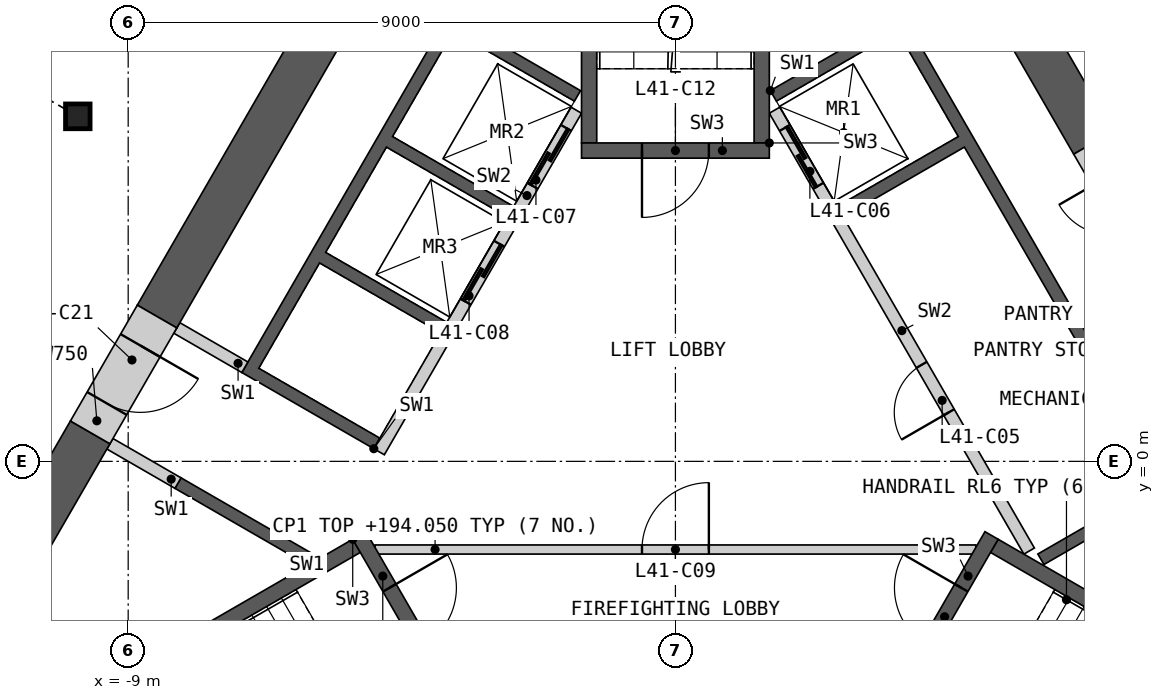
"""IFC4 building model, lengths in metres.
Left out: names, types, materials, properties, quantities, classifications, styles, units other than length and angle.
Written with IfcOpenShell. Run it as: python <this file> out.ifc"""

import sys

from ifc_helpers import new_model, si_unit, direction, frame, frame_2d, origin, origin_2d, place, context, subcontext, project, spatial, polyline, rectangle, i_section, outline, extrude, element, fill, save


model = new_model("IFC4")
c1 = context("Model", 3, precision=1e-05, world=origin(), true_north=direction((0.0, 1.0)))
c2 = subcontext(c1, "Body", "Model", "MODEL_VIEW")
j1 = project(units=[si_unit("LENGTHUNIT", "METRE"), si_unit("PLANEANGLEUNIT", "RADIAN")], contexts=[c1])
p1 = place(None, origin())
s1 = spatial("IfcSite", under=j1, at=p1, CompositionType="ELEMENT")
p2 = place(p1, origin())
s2 = spatial("IfcBuilding", under=s1, at=p2, CompositionType="ELEMENT")
p3 = place(p2, frame((0.0, 0.0, 190.8)))
s3 = spatial("IfcBuildingStorey", under=s2, at=p3, CompositionType="ELEMENT", Elevation=190.8)
p4 = place(p3, frame((-9.828, 5.675, 0.0), z_axis=(0.0, 0.0, 1.0), x_axis=(1.0, 0.0, 0.0)))
e1 = element("IfcColumn", 1, at=p4, inside=s3, PredefinedType="COLUMN", context=c2, shape_type="SweptSolid", body=[
    extrude(i_section(OverallWidth=0.404, OverallDepth=0.407, WebThickness=0.027, FlangeThickness=0.044, at=origin_2d()), origin(), (0.0, 0.0, 1.0), 3.6),
])
p5 = place(p3, origin())
e2 = element("IfcWall", 2, at=p5, inside=s3, PredefinedType="SHEAR", context=c2, shape_type="SweptSolid", body=[
    extrude(outline(polyline([(1.561, 6.097), (3.731, 7.35), (8.231, -0.444), (6.061, -1.697), (5.96, -1.524), (7.952, -0.374), (4.752, 5.169), (2.76, 4.019), (2.66, 4.192), (4.652, 5.342), (3.652, 7.074), (1.66, 5.924), (1.561, 6.097)])), origin(), (0.0, 0.0, 1.0), 3.25),
])
p6 = place(p3, frame((5.817, -1.476, 0.0), z_axis=(0.0, 0.0, 1.0), x_axis=(-0.500002616675, 0.866023893041, 0.0)))
e3 = element("IfcWall", 3, at=p6, inside=s3, PredefinedType="SOLIDWALL", context=c2, shape_type="SweptSolid", body=[
    extrude(rectangle(XDim=8.373, YDim=0.2, at=frame_2d((4.187, 0.0))), origin(), (0.0, 0.0, 1.0), 3.25),
])
p7 = place(p6, frame((2.637, 0.0, 0.0)))
e4 = element("IfcOpeningElement", 4, at=p7, cuts=e3, PredefinedType="OPENING", context=c2, shape_type="SweptSolid", body=[
    extrude(rectangle(XDim=0.9, YDim=2.1, at=frame_2d((0.45, 1.05))), frame((0.0, 0.11, 0.0), z_axis=(0.0, -1.0, 0.0), x_axis=(1.0, 0.0, 0.0)), (0.0, 0.0, 1.0), 0.22),
])
p8 = place(p6, frame((6.937, 0.0, 0.0)))
e5 = element("IfcOpeningElement", 5, at=p8, cuts=e3, PredefinedType="OPENING", context=c2, shape_type="SweptSolid", body=[
    extrude(rectangle(XDim=1.1, YDim=2.1, at=frame_2d((0.55, 1.05))), frame((0.0, 0.11, 0.0), z_axis=(0.0, -1.0, 0.0), x_axis=(1.0, 0.0, 0.0)), (0.0, 0.0, 1.0), 0.22),
])
p9 = place(p3, origin())
e6 = element("IfcWall", 6, at=p9, inside=s3, PredefinedType="SHEAR", context=c2, shape_type="SweptSolid", body=[
    extrude(outline(polyline([(-6.061, -1.697), (-8.231, -0.444), (-8.131, -0.271), (-5.96, -1.524), (-6.061, -1.697)])), origin(), (0.0, 0.0, 1.0), 3.25),
])
p10 = place(p3, origin())
e7 = element("IfcWall", 7, at=p10, inside=s3, PredefinedType="SHEAR", context=c2, shape_type="SweptSolid", body=[
    extrude(outline(polyline([(-4.96, 0.208), (-7.131, 1.461), (-3.731, 7.35), (-1.561, 6.097), (-1.66, 5.924), (-3.652, 7.074), (-4.652, 5.342), (-2.66, 4.192), (-2.76, 4.019), (-4.752, 5.169), (-5.752, 3.437), (-3.76, 2.287), (-3.861, 2.113), (-5.852, 3.263), (-6.852, 1.531), (-4.861, 0.381), (-4.96, 0.208)])), origin(), (0.0, 0.0, 1.0), 3.25),
])
p11 = place(p3, frame((-1.631, 5.776, 0.0), z_axis=(0.0, 0.0, 1.0), x_axis=(-0.499992876559, -0.866029516466, 0.0)))
e8 = element("IfcWall", 8, at=p11, inside=s3, PredefinedType="SOLIDWALL", context=c2, shape_type="SweptSolid", body=[
    extrude(rectangle(XDim=6.486, YDim=0.2, at=frame_2d((3.243, 0.0))), origin(), (0.0, 0.0, 1.0), 3.25),
])
p12 = place(p11, frame((0.337, 0.0, 0.0)))
e9 = element("IfcOpeningElement", 9, at=p12, cuts=e8, PredefinedType="OPENING", context=c2, shape_type="SweptSolid", body=[
    extrude(rectangle(XDim=1.1, YDim=2.1, at=frame_2d((0.55, 1.05))), frame((0.0, 0.11, 0.0), z_axis=(0.0, -1.0, 0.0), x_axis=(1.0, 0.0, 0.0)), (0.0, 0.0, 1.0), 0.22),
])
p13 = place(p11, frame((2.537, 0.0, 0.0)))
e10 = element("IfcOpeningElement", 10, at=p13, cuts=e8, PredefinedType="OPENING", context=c2, shape_type="SweptSolid", body=[
    extrude(rectangle(XDim=1.1, YDim=2.1, at=frame_2d((0.55, 1.05))), frame((0.0, 0.11, 0.0), z_axis=(0.0, -1.0, 0.0), x_axis=(1.0, 0.0, 0.0)), (0.0, 0.0, 1.0), 0.22),
])
for number, where, z_axis, x_axis in (
    (11, (-7.081, 1.548, 0.0), (0.0, 0.0, 1.0), (-0.866, 0.5, 0.0)),
    (12, (-8.181, -0.357, 0.0), (0.0, 0.0, 1.0), (-0.866, 0.5, 0.0)),
):
    element("IfcWall", number, at=place(p3, frame(where, z_axis=z_axis, x_axis=x_axis)), inside=s3, PredefinedType="SHEAR", context=c2, shape_type="SweptSolid", body=[
        extrude(rectangle(XDim=1.293, YDim=0.2, at=frame_2d((0.646, 0.0))), origin(), (0.0, 0.0, 1.0), 3.25),
    ])
p14 = place(p3, frame((-4.941, -1.45, 0.0), z_axis=(0.0, 0.0, 1.0), x_axis=(1.0, 0.0, 0.0)))
e13 = element("IfcWall", 13, at=p14, inside=s3, PredefinedType="PARTITIONING", context=c2, shape_type="SweptSolid", body=[
    extrude(rectangle(XDim=9.882, YDim=0.15, at=frame_2d((4.941, 0.0))), origin(), (0.0, 0.0, 1.0), 3.25),
])
p15 = place(p14, frame((4.391, 0.0, 0.0)))
e14 = element("IfcOpeningElement", 14, at=p15, cuts=e13, PredefinedType="OPENING", context=c2, shape_type="SweptSolid", body=[
    extrude(rectangle(XDim=1.1, YDim=2.1, at=frame_2d((0.55, 1.05))), frame((0.0, 0.085, 0.0), z_axis=(0.0, -1.0, 0.0), x_axis=(1.0, 0.0, 0.0)), (0.0, 0.0, 1.0), 0.17),
])
p16 = place(p3, origin())
e15 = element("IfcWall", 15, at=p16, inside=s3, PredefinedType="SHEAR", context=c2, shape_type="SweptSolid", body=[
    extrude(outline(polyline([(-5.307, -1.281), (-10.374, -4.206), (-10.032, -4.298), (-5.182, -1.498), (-5.307, -1.281)])), origin(), (0.0, 0.0, 1.0), 3.25),
])
p17 = place(p3, frame((-5.199, -1.219, 0.0), z_axis=(0.0, 0.0, 1.0), x_axis=(0.499982516597, -0.866035497597, 0.0)))
e16 = element("IfcWall", 16, at=p17, inside=s3, PredefinedType="SHEAR", context=c2, shape_type="SweptSolid", body=[
    extrude(rectangle(XDim=3.088, YDim=0.25, at=frame_2d((1.544, 0.0))), origin(), (0.0, 0.0, 1.0), 3.25),
])
p18 = place(p17, frame((0.994, 0.0, 0.0)))
e17 = element("IfcOpeningElement", 17, at=p18, cuts=e16, PredefinedType="OPENING", context=c2, shape_type="SweptSolid", body=[
    extrude(rectangle(XDim=1.1, YDim=2.1, at=frame_2d((0.55, 1.05))), frame((0.0, 0.135, 0.0), z_axis=(0.0, -1.0, 0.0), x_axis=(1.0, 0.0, 0.0)), (0.0, 0.0, 1.0), 0.27),
])
p19 = place(p3, origin())
e18 = element("IfcWall", 18, at=p19, inside=s3, PredefinedType="SHEAR", context=c2, shape_type="SweptSolid", body=[
    extrude(outline(polyline([(10.032, -4.298), (10.374, -4.206), (5.307, -1.281), (5.182, -1.498), (10.032, -4.298)])), origin(), (0.0, 0.0, 1.0), 3.25),
])
p20 = place(p3, frame((3.655, -3.893, 0.0), z_axis=(0.0, 0.0, 1.0), x_axis=(0.499982516597, 0.866035497597, 0.0)))
e19 = element("IfcWall", 19, at=p20, inside=s3, PredefinedType="SHEAR", context=c2, shape_type="SweptSolid", body=[
    extrude(rectangle(XDim=3.088, YDim=0.25, at=frame_2d((1.544, 0.0))), origin(), (0.0, 0.0, 1.0), 3.25),
])
p21 = place(p20, frame((0.994, 0.0, 0.0)))
e20 = element("IfcOpeningElement", 20, at=p21, cuts=e19, PredefinedType="OPENING", context=c2, shape_type="SweptSolid", body=[
    extrude(rectangle(XDim=1.1, YDim=2.1, at=frame_2d((0.55, 1.05))), frame((0.0, 0.135, 0.0), z_axis=(0.0, -1.0, 0.0), x_axis=(1.0, 0.0, 0.0)), (0.0, 0.0, 1.0), 0.27),
])
p22 = place(p3, origin())
e21 = element("IfcWall", 21, at=p22, inside=s3, PredefinedType="SHEAR", context=c2, shape_type="SweptSolid", body=[
    extrude(outline(polyline([(1.544, 5.237), (1.544, 11.087), (1.294, 10.837), (1.294, 5.237), (1.544, 5.237)])), origin(), (0.0, 0.0, 1.0), 3.25),
])
p23 = place(p3, origin())
e22 = element("IfcWall", 22, at=p23, inside=s3, PredefinedType="SHEAR", context=c2, shape_type="SweptSolid", body=[
    extrude(outline(polyline([(-1.294, 10.837), (-1.544, 11.087), (-1.544, 5.237), (-1.294, 5.237), (-1.294, 10.837)])), origin(), (0.0, 0.0, 1.0), 3.25),
])
p24 = place(p3, frame((1.544, 5.112, 0.0), z_axis=(0.0, 0.0, 1.0), x_axis=(-1.0, 0.0, 0.0)))
e23 = element("IfcWall", 23, at=p24, inside=s3, PredefinedType="SHEAR", context=c2, shape_type="SweptSolid", body=[
    extrude(rectangle(XDim=3.088, YDim=0.25, at=frame_2d((1.544, 0.0))), origin(), (0.0, 0.0, 1.0), 3.25),
])
p25 = place(p24, frame((0.994, 0.0, 0.0)))
e24 = element("IfcOpeningElement", 24, at=p25, cuts=e23, PredefinedType="OPENING", context=c2, shape_type="SweptSolid", body=[
    extrude(rectangle(XDim=1.1, YDim=2.1, at=frame_2d((0.55, 1.05))), frame((0.0, 0.135, 0.0), z_axis=(0.0, -1.0, 0.0), x_axis=(1.0, 0.0, 0.0)), (0.0, 0.0, 1.0), 0.27),
])
p26 = place(p3, frame((6.875, 5.24, 0.0), z_axis=(0.0, 0.0, 1.0), x_axis=(-0.499997217876, 0.866027010039, 0.0)))
e25 = element("IfcWall", 25, at=p26, inside=s3, PredefinedType="SHEAR", context=c2, shape_type="SweptSolid", body=[
    extrude(rectangle(XDim=13.101, YDim=0.75, at=frame_2d((6.551, 0.0))), origin(), (0.0, 0.0, 1.0), 3.25),
])
p27 = place(p3, frame((-4.95, 8.574, 0.0), z_axis=(0.0, 0.0, 1.0), x_axis=(-0.499987463267, -0.866032641749, 0.0)))
e26 = element("IfcWall", 26, at=p27, inside=s3, PredefinedType="SHEAR", context=c2, shape_type="SweptSolid", body=[
    extrude(rectangle(XDim=7.151, YDim=0.75, at=frame_2d((3.575, 0.0))), origin(), (0.0, 0.0, 1.0), 3.25),
])
p28 = place(p3, frame((-9.625, 0.477, 0.0), z_axis=(0.0, 0.0, 1.0), x_axis=(-0.499951145694, -0.866053607994, 0.0)))
e27 = element("IfcWall", 27, at=p28, inside=s3, PredefinedType="SHEAR", context=c2, shape_type="SweptSolid", body=[
    extrude(rectangle(XDim=3.851, YDim=0.75, at=frame_2d((1.925, 0.0))), origin(), (0.0, 0.0, 1.0), 3.25),
])
p29 = place(p3, frame((7.975, 3.334, 0.0), z_axis=(0.0, 0.0, 1.0), x_axis=(-0.500077893725, 0.86598042715, 0.0)))
e28 = element("IfcWall", 28, at=p29, inside=s3, PredefinedType="SHEAR", context=c2, shape_type="SweptSolid", body=[
    extrude(rectangle(XDim=2.2, YDim=0.75, at=frame_2d((1.1, 0.0))), origin(), (0.0, 0.0, 1.0), 3.25),
])
p30 = place(p29, frame((0.6, 0.0, 0.0)))
e29 = element("IfcOpeningElement", 29, at=p30, cuts=e28, PredefinedType="OPENING", context=c2, shape_type="SweptSolid", body=[
    extrude(rectangle(XDim=1.0, YDim=2.1, at=frame_2d((0.5, 1.05))), frame((0.0, 0.385, 0.0), z_axis=(0.0, -1.0, 0.0), x_axis=(1.0, 0.0, 0.0)), (0.0, 0.0, 1.0), 0.77),
])
p31 = place(p3, frame((-8.525, 2.382, 0.0), z_axis=(0.0, 0.0, 1.0), x_axis=(-0.500077893725, -0.86598042715, 0.0)))
e30 = element("IfcWall", 30, at=p31, inside=s3, PredefinedType="SHEAR", context=c2, shape_type="SweptSolid", body=[
    extrude(rectangle(XDim=2.2, YDim=0.75, at=frame_2d((1.1, 0.0))), origin(), (0.0, 0.0, 1.0), 3.25),
])
p32 = place(p31, frame((0.55, 0.0, 0.0)))
e31 = element("IfcOpeningElement", 31, at=p32, cuts=e30, PredefinedType="OPENING", context=c2, shape_type="SweptSolid", body=[
    extrude(rectangle(XDim=1.1, YDim=2.1, at=frame_2d((0.55, 1.05))), frame((0.0, 0.385, 0.0), z_axis=(0.0, -1.0, 0.0), x_axis=(1.0, 0.0, 0.0)), (0.0, 0.0, 1.0), 0.77),
])
p33 = place(p3, frame((-19.476, -5.035, 0.0), z_axis=(0.0, 0.0, 1.0), x_axis=(0.500000757641, 0.86602496636, 0.0)))
e32 = element("IfcWall", 32, at=p33, inside=s3, PredefinedType="PARTITIONING", context=c2, shape_type="SweptSolid", body=[
    extrude(rectangle(XDim=28.198, YDim=0.2, at=frame_2d((14.099, 0.0))), origin(), (0.0, 0.0, 1.0), 3.25),
])
p34 = place(p33, frame((25.796, 0.0, 0.0)))
e33 = element("IfcOpeningElement", 33, at=p34, cuts=e32, PredefinedType="OPENING", context=c2, shape_type="SweptSolid", body=[
    extrude(rectangle(XDim=0.95, YDim=2.1, at=frame_2d((0.475, 1.05))), frame((0.0, 0.11, 0.0), z_axis=(0.0, -1.0, 0.0), x_axis=(1.0, 0.0, 0.0)), (0.0, 0.0, 1.0), 0.22),
])
p35 = place(p33, frame((14.603, 0.0, 0.0)))
e34 = element("IfcOpeningElement", 34, at=p35, cuts=e32, PredefinedType="OPENING", context=c2, shape_type="SweptSolid", body=[
    extrude(rectangle(XDim=1.1, YDim=2.1, at=frame_2d((0.55, 1.05))), frame((0.0, 0.11, 0.0), z_axis=(0.0, -1.0, 0.0), x_axis=(1.0, 0.0, 0.0)), (0.0, 0.0, 1.0), 0.22),
])
p36 = place(p33, frame((11.993, 0.0, 0.0)))
e35 = element("IfcOpeningElement", 35, at=p36, cuts=e32, PredefinedType="OPENING", context=c2, shape_type="SweptSolid", body=[
    extrude(rectangle(XDim=1.1, YDim=2.1, at=frame_2d((0.55, 1.05))), frame((0.0, 0.11, 0.0), z_axis=(0.0, -1.0, 0.0), x_axis=(1.0, 0.0, 0.0)), (0.0, 0.0, 1.0), 0.22),
])
p37 = place(p33, frame((1.452, 0.0, 0.0)))
e36 = element("IfcOpeningElement", 36, at=p37, cuts=e32, PredefinedType="OPENING", context=c2, shape_type="SweptSolid", body=[
    extrude(rectangle(XDim=0.95, YDim=2.1, at=frame_2d((0.475, 1.05))), frame((0.0, 0.11, 0.0), z_axis=(0.0, -1.0, 0.0), x_axis=(1.0, 0.0, 0.0)), (0.0, 0.0, 1.0), 0.22),
])
p38 = place(p3, frame((5.038, 13.972, 0.0), z_axis=(0.0, 0.0, 1.0), x_axis=(0.50000393355, -0.866023132736, 0.0)))
e37 = element("IfcWall", 37, at=p38, inside=s3, PredefinedType="PARTITIONING", context=c2, shape_type="SweptSolid", body=[
    extrude(rectangle(XDim=9.335, YDim=0.2, at=frame_2d((4.667, 0.0))), origin(), (0.0, 0.0, 1.0), 3.25),
])
p39 = place(p38, frame((5.979, 0.0, 0.0)))
e38 = element("IfcOpeningElement", 38, at=p39, cuts=e37, PredefinedType="OPENING", context=c2, shape_type="SweptSolid", body=[
    extrude(rectangle(XDim=1.8, YDim=2.1, at=frame_2d((0.9, 1.05))), frame((0.0, 0.11, 0.0), z_axis=(0.0, -1.0, 0.0), x_axis=(1.0, 0.0, 0.0)), (0.0, 0.0, 1.0), 0.22),
])
p40 = place(p38, frame((3.163, 0.0, 0.0)))
e39 = element("IfcOpeningElement", 39, at=p40, cuts=e37, PredefinedType="OPENING", context=c2, shape_type="SweptSolid", body=[
    extrude(rectangle(XDim=1.0, YDim=2.1, at=frame_2d((0.5, 1.05))), frame((0.0, 0.11, 0.0), z_axis=(0.0, -1.0, 0.0), x_axis=(1.0, 0.0, 0.0)), (0.0, 0.0, 1.0), 0.22),
])
p41 = place(p7, origin())
e40 = element("IfcDoor", 40, at=p41, inside=s3, OperationType="SINGLE_SWING_LEFT", PredefinedType="DOOR", context=c2, shape_type="SweptSolid", body=[
    extrude(rectangle(XDim=0.9, YDim=2.1, at=frame_2d((0.45, 1.05))), frame((0.0, 0.025, 0.0), z_axis=(0.0, -1.0, 0.0), x_axis=(1.0, 0.0, 0.0)), (0.0, 0.0, 1.0), 0.05),
])
fill(e4, e40)
p42 = place(p8, origin())
e41 = element("IfcDoor", 41, at=p42, inside=s3, OperationType="SLIDING_TO_LEFT", PredefinedType="DOOR", context=c2, shape_type="SweptSolid", body=[
    extrude(rectangle(XDim=1.1, YDim=2.1, at=frame_2d((0.55, 1.05))), frame((0.0, 0.025, 0.0), z_axis=(0.0, -1.0, 0.0), x_axis=(1.0, 0.0, 0.0)), (0.0, 0.0, 1.0), 0.05),
])
fill(e5, e41)
p43 = place(p12, origin())
e42 = element("IfcDoor", 42, at=p43, inside=s3, OperationType="SLIDING_TO_LEFT", PredefinedType="DOOR", context=c2, shape_type="SweptSolid", body=[
    extrude(rectangle(XDim=1.1, YDim=2.1, at=frame_2d((0.55, 1.05))), frame((0.0, 0.025, 0.0), z_axis=(0.0, -1.0, 0.0), x_axis=(1.0, 0.0, 0.0)), (0.0, 0.0, 1.0), 0.05),
])
fill(e9, e42)
p44 = place(p13, origin())
e43 = element("IfcDoor", 43, at=p44, inside=s3, OperationType="SLIDING_TO_LEFT", PredefinedType="DOOR", context=c2, shape_type="SweptSolid", body=[
    extrude(rectangle(XDim=1.1, YDim=2.1, at=frame_2d((0.55, 1.05))), frame((0.0, 0.025, 0.0), z_axis=(0.0, -1.0, 0.0), x_axis=(1.0, 0.0, 0.0)), (0.0, 0.0, 1.0), 0.05),
])
fill(e10, e43)
p45 = place(p15, origin())
e44 = element("IfcDoor", 44, at=p45, inside=s3, OperationType="SINGLE_SWING_RIGHT", PredefinedType="DOOR", context=c2, shape_type="SweptSolid", body=[
    extrude(rectangle(XDim=1.1, YDim=2.1, at=frame_2d((0.55, 1.05))), frame((0.0, 0.025, 0.0), z_axis=(0.0, -1.0, 0.0), x_axis=(1.0, 0.0, 0.0)), (0.0, 0.0, 1.0), 0.05),
])
fill(e14, e44)
p46 = place(p18, origin())
e45 = element("IfcDoor", 45, at=p46, inside=s3, OperationType="SINGLE_SWING_LEFT", PredefinedType="DOOR", context=c2, shape_type="SweptSolid", body=[
    extrude(rectangle(XDim=1.1, YDim=2.1, at=frame_2d((0.55, 1.05))), frame((0.0, 0.025, 0.0), z_axis=(0.0, -1.0, 0.0), x_axis=(1.0, 0.0, 0.0)), (0.0, 0.0, 1.0), 0.05),
])
fill(e17, e45)
p47 = place(p21, origin())
e46 = element("IfcDoor", 46, at=p47, inside=s3, OperationType="SINGLE_SWING_RIGHT", PredefinedType="DOOR", context=c2, shape_type="SweptSolid", body=[
    extrude(rectangle(XDim=1.1, YDim=2.1, at=frame_2d((0.55, 1.05))), frame((0.0, 0.025, 0.0), z_axis=(0.0, -1.0, 0.0), x_axis=(1.0, 0.0, 0.0)), (0.0, 0.0, 1.0), 0.05),
])
fill(e20, e46)
p48 = place(p25, origin())
e47 = element("IfcDoor", 47, at=p48, inside=s3, OperationType="SINGLE_SWING_RIGHT", PredefinedType="DOOR", context=c2, shape_type="SweptSolid", body=[
    extrude(rectangle(XDim=1.1, YDim=2.1, at=frame_2d((0.55, 1.05))), frame((0.0, 0.025, 0.0), z_axis=(0.0, -1.0, 0.0), x_axis=(1.0, 0.0, 0.0)), (0.0, 0.0, 1.0), 0.05),
])
fill(e24, e47)
p49 = place(p32, origin())
e48 = element("IfcDoor", 48, at=p49, inside=s3, OperationType="SINGLE_SWING_LEFT", PredefinedType="DOOR", context=c2, shape_type="SweptSolid", body=[
    extrude(rectangle(XDim=1.1, YDim=2.1, at=frame_2d((0.55, 1.05))), frame((0.0, 0.13, 0.0), z_axis=(0.0, -1.0, 0.0), x_axis=(1.0, 0.0, 0.0)), (0.0, 0.0, 1.0), 0.05),
])
fill(e31, e48)
save(model, sys.argv[1])
